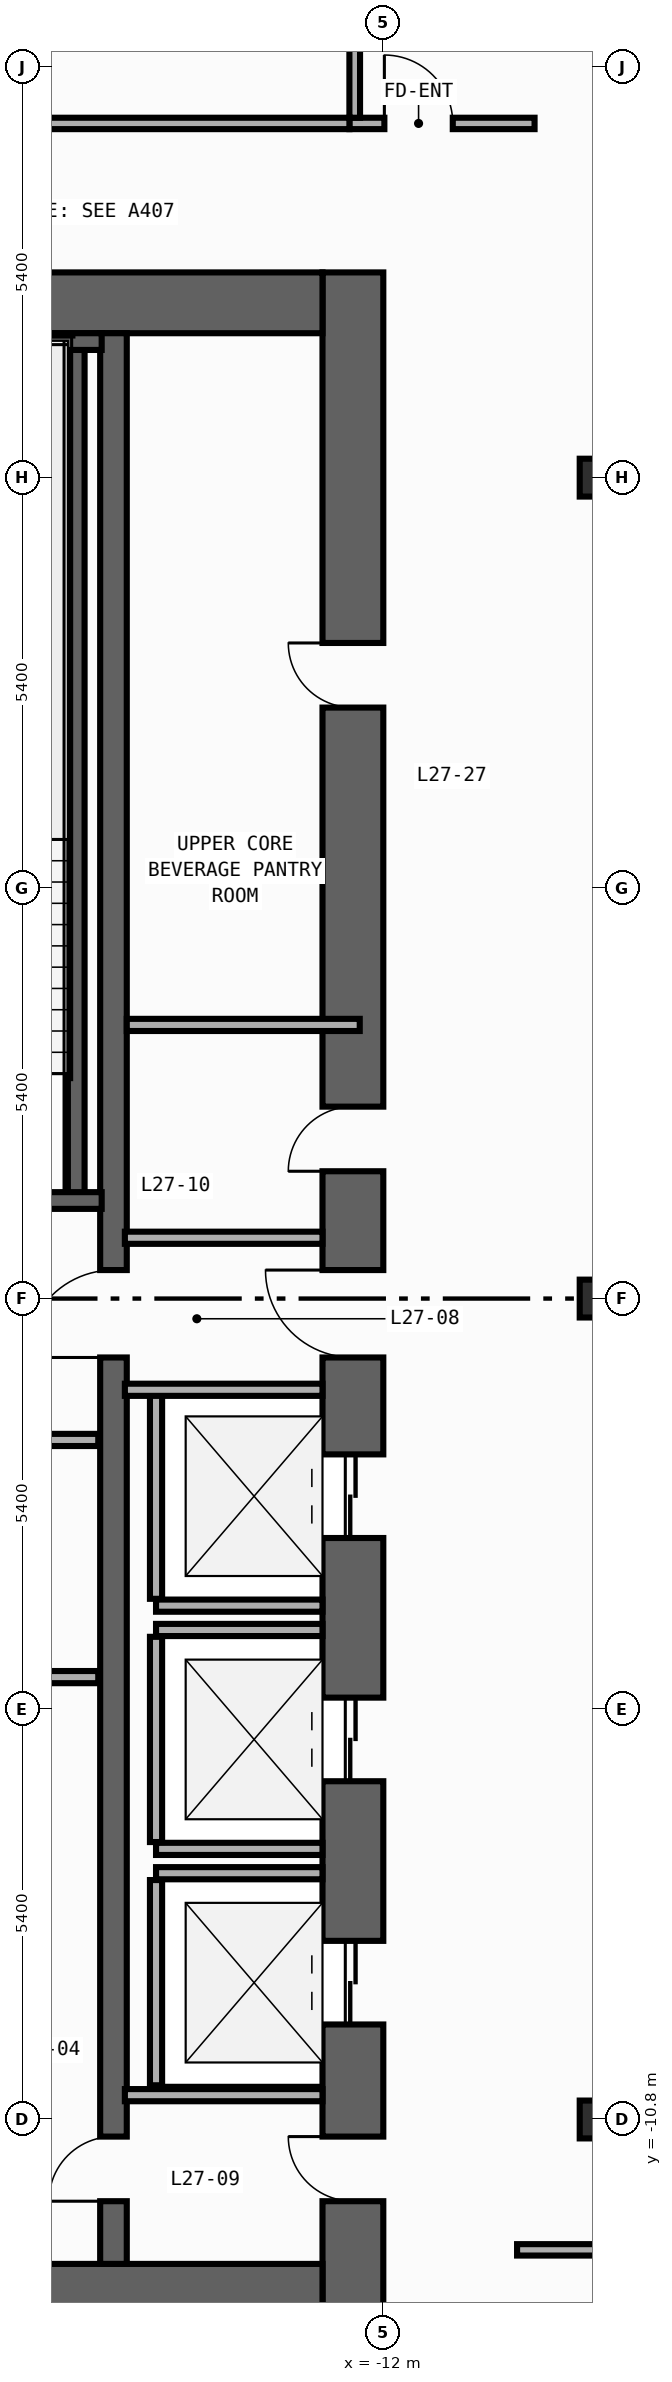
"""IFC4 building model, lengths in metres.
Left out: names, types, materials, properties, quantities, classifications, styles, units other than length and angle.
Written with IfcOpenShell. Run it as: python <this file> out.ifc"""

import sys

from ifc_helpers import new_model, si_unit, direction, frame, frame_2d, origin, origin_2d, place, context, subcontext, project, spatial, rectangle, i_section, extrude, element, fill, save


model = new_model("IFC4")
c1 = context("Model", 3, precision=1e-05, world=origin(), true_north=direction((0.0, 1.0)))
c2 = subcontext(c1, "Body", "Model", "MODEL_VIEW")
j1 = project(units=[si_unit("LENGTHUNIT", "METRE"), si_unit("PLANEANGLEUNIT", "RADIAN")], contexts=[c1])
p1 = place(None, origin())
s1 = spatial("IfcSite", under=j1, at=p1, CompositionType="ELEMENT")
p2 = place(p1, origin())
s2 = spatial("IfcBuilding", under=s1, at=p2, CompositionType="ELEMENT")
p3 = place(p2, frame((0.0, 0.0, 118.4)))
s3 = spatial("IfcBuildingStorey", under=s2, at=p3, CompositionType="ELEMENT", Elevation=118.4)
p4 = place(p3, frame((-12.4, -13.5, 0.0), z_axis=(0.0, 0.0, 1.0), x_axis=(0.0, 1.0, 0.0)))
e1 = element("IfcWall", 1, at=p4, inside=s3, PredefinedType="SHEAR", context=c2, shape_type="SweptSolid", body=[
    extrude(rectangle(XDim=27.0, YDim=0.8, at=frame_2d((13.5, 0.0))), origin(), (0.0, 0.0, 1.0), 3.94),
])
p5 = place(p4, frame((10.35, 0.0, 0.0)))
e2 = element("IfcOpeningElement", 2, at=p5, cuts=e1, PredefinedType="OPENING", context=c2, shape_type="SweptSolid", body=[
    extrude(rectangle(XDim=1.1, YDim=2.2, at=frame_2d((0.55, 1.1))), frame((0.0, 0.41, 0.0), z_axis=(0.0, -1.0, 0.0), x_axis=(1.0, 0.0, 0.0)), (0.0, 0.0, 1.0), 0.82),
])
p6 = place(p4, frame((7.15, 0.0, 0.0)))
e3 = element("IfcOpeningElement", 3, at=p6, cuts=e1, PredefinedType="OPENING", context=c2, shape_type="SweptSolid", body=[
    extrude(rectangle(XDim=1.1, YDim=2.2, at=frame_2d((0.55, 1.1))), frame((0.0, 0.41, 0.0), z_axis=(0.0, -1.0, 0.0), x_axis=(1.0, 0.0, 0.0)), (0.0, 0.0, 1.0), 0.82),
])
p7 = place(p4, frame((3.95, 0.0, 0.0)))
e4 = element("IfcOpeningElement", 4, at=p7, cuts=e1, PredefinedType="OPENING", context=c2, shape_type="SweptSolid", body=[
    extrude(rectangle(XDim=1.1, YDim=2.2, at=frame_2d((0.55, 1.1))), frame((0.0, 0.41, 0.0), z_axis=(0.0, -1.0, 0.0), x_axis=(1.0, 0.0, 0.0)), (0.0, 0.0, 1.0), 0.82),
])
p8 = place(p4, frame((15.175, 0.0, 0.0)))
e5 = element("IfcOpeningElement", 5, at=p8, cuts=e1, PredefinedType="OPENING", context=c2, shape_type="SweptSolid", body=[
    extrude(rectangle(XDim=0.85, YDim=2.1, at=frame_2d((0.425, 1.05))), frame((0.0, 0.41, 0.0), z_axis=(0.0, -1.0, 0.0), x_axis=(1.0, 0.0, 0.0)), (0.0, 0.0, 1.0), 0.82),
])
p9 = place(p4, frame((21.275, 0.0, 0.0)))
e6 = element("IfcOpeningElement", 6, at=p9, cuts=e1, PredefinedType="OPENING", context=c2, shape_type="SweptSolid", body=[
    extrude(rectangle(XDim=0.85, YDim=2.1, at=frame_2d((0.425, 1.05))), frame((0.0, 0.41, 0.0), z_axis=(0.0, -1.0, 0.0), x_axis=(1.0, 0.0, 0.0)), (0.0, 0.0, 1.0), 0.82),
])
p10 = place(p4, frame((12.725, 0.0, 0.0)))
e7 = element("IfcOpeningElement", 7, at=p10, cuts=e1, PredefinedType="OPENING", context=c2, shape_type="SweptSolid", body=[
    extrude(rectangle(XDim=1.15, YDim=2.2, at=frame_2d((0.575, 1.1))), frame((0.0, 0.41, 0.0), z_axis=(0.0, -1.0, 0.0), x_axis=(1.0, 0.0, 0.0)), (0.0, 0.0, 1.0), 0.82),
])
p11 = place(p4, frame((1.625, 0.0, 0.0)))
e8 = element("IfcOpeningElement", 8, at=p11, cuts=e1, PredefinedType="OPENING", context=c2, shape_type="SweptSolid", body=[
    extrude(rectangle(XDim=0.85, YDim=2.1, at=frame_2d((0.425, 1.05))), frame((0.0, 0.41, 0.0), z_axis=(0.0, -1.0, 0.0), x_axis=(1.0, 0.0, 0.0)), (0.0, 0.0, 1.0), 0.82),
])
for number, where, z_axis, x_axis in (
    (9, (-19.6, -13.1, 0.0), (0.0, 0.0, 1.0), (1.0, 0.0, 0.0)),
    (10, (-19.6, 13.1, 0.0), (0.0, 0.0, 1.0), (1.0, 0.0, 0.0)),
):
    element("IfcWall", number, at=place(p3, frame(where, z_axis=z_axis, x_axis=x_axis)), inside=s3, PredefinedType="SHEAR", context=c2, shape_type="SweptSolid", body=[
        extrude(rectangle(XDim=6.8, YDim=0.8, at=frame_2d((3.4, 0.0))), origin(), (0.0, 0.0, 1.0), 3.94),
    ])
p12 = place(p3, frame((-15.55, -12.7, 0.0), z_axis=(0.0, 0.0, 1.0), x_axis=(0.0, 1.0, 0.0)))
e11 = element("IfcWall", 11, at=p12, inside=s3, PredefinedType="SHEAR", context=c2, shape_type="SweptSolid", body=[
    extrude(rectangle(XDim=25.4, YDim=0.35, at=frame_2d((12.7, 0.0))), origin(), (0.0, 0.0, 1.0), 3.94),
])
p13 = place(p12, frame((11.925, 0.0, 0.0)))
e12 = element("IfcOpeningElement", 12, at=p13, cuts=e11, PredefinedType="OPENING", context=c2, shape_type="SweptSolid", body=[
    extrude(rectangle(XDim=1.15, YDim=2.2, at=frame_2d((0.575, 1.1))), frame((0.0, 0.185, 0.0), z_axis=(0.0, -1.0, 0.0), x_axis=(1.0, 0.0, 0.0)), (0.0, 0.0, 1.0), 0.37),
])
p14 = place(p12, frame((0.825, 0.0, 0.0)))
e13 = element("IfcOpeningElement", 13, at=p14, cuts=e11, PredefinedType="OPENING", context=c2, shape_type="SweptSolid", body=[
    extrude(rectangle(XDim=0.85, YDim=2.1, at=frame_2d((0.425, 1.05))), frame((0.0, 0.185, 0.0), z_axis=(0.0, -1.0, 0.0), x_axis=(1.0, 0.0, 0.0)), (0.0, 0.0, 1.0), 0.37),
])
p15 = place(p3, frame((-16.04, 1.29, 0.0), z_axis=(0.0, 0.0, 1.0), x_axis=(0.0, 1.0, 0.0)))
e14 = element("IfcWall", 14, at=p15, inside=s3, PredefinedType="SHEAR", context=c2, shape_type="SweptSolid", body=[
    extrude(rectangle(XDim=11.3, YDim=0.22, at=frame_2d((5.65, 0.0))), origin(), (0.0, 0.0, 1.0), 3.94),
])
p16 = place(p3, frame((-19.62, 12.59, 0.0), z_axis=(0.0, 0.0, 1.0), x_axis=(1.0, 0.0, 0.0)))
e15 = element("IfcWall", 15, at=p16, inside=s3, PredefinedType="SHEAR", context=c2, shape_type="SweptSolid", body=[
    extrude(rectangle(XDim=3.915, YDim=0.22, at=frame_2d((1.958, 0.0))), origin(), (0.0, 0.0, 1.0), 3.94),
])
p17 = place(p3, frame((-19.62, 1.29, 0.0), z_axis=(0.0, 0.0, 1.0), x_axis=(1.0, 0.0, 0.0)))
e16 = element("IfcWall", 16, at=p17, inside=s3, PredefinedType="SHEAR", context=c2, shape_type="SweptSolid", body=[
    extrude(rectangle(XDim=3.915, YDim=0.22, at=frame_2d((1.958, 0.0))), origin(), (0.0, 0.0, 1.0), 3.94),
])
p18 = place(p17, frame((1.08, 0.0, 0.0)))
e17 = element("IfcOpeningElement", 17, at=p18, cuts=e16, PredefinedType="OPENING", context=c2, shape_type="SweptSolid", body=[
    extrude(rectangle(XDim=1.1, YDim=2.2, at=frame_2d((0.55, 1.1))), frame((0.0, 0.12, 0.0), z_axis=(0.0, -1.0, 0.0), x_axis=(1.0, 0.0, 0.0)), (0.0, 0.0, 1.0), 0.24),
])
for number, where, z_axis, x_axis in (
    (18, (-9.2, -10.8, 0.0), (0.0, 0.0, 1.0), (1.0, 0.0, 0.0)),
    (19, (-9.2, 0.0, 0.0), (0.0, 0.0, 1.0), (1.0, 0.0, 0.0)),
    (20, (-9.2, 10.8, 0.0), (0.0, 0.0, 1.0), (1.0, 0.0, 0.0)),
):
    element("IfcColumn", number, at=place(p3, frame(where, z_axis=z_axis, x_axis=x_axis)), inside=s3, PredefinedType="COLUMN", context=c2, shape_type="SweptSolid", body=[
        extrude(i_section(OverallWidth=0.432, OverallDepth=0.498, WebThickness=0.045, FlangeThickness=0.07, FilletRadius=0.022, at=origin_2d()), origin(), (0.0, 0.0, 1.0), 4.2),
    ])
p19 = place(p3, frame((-14.99, -4.04, 0.0), z_axis=(0.0, 0.0, 1.0), x_axis=(1.0, 0.0, 0.0)))
e21 = element("IfcWall", 21, at=p19, inside=s3, PredefinedType="STANDARD", context=c2, shape_type="SweptSolid", body=[
    extrude(rectangle(XDim=2.19, YDim=0.16, at=frame_2d((1.095, 0.0))), origin(), (0.0, 0.0, 1.0), 3.94),
])
p20 = place(p3, frame((-14.99, -3.95, 0.0), z_axis=(0.0, 0.0, 1.0), x_axis=(0.0, 1.0, 0.0)))
e22 = element("IfcWall", 22, at=p20, inside=s3, PredefinedType="STANDARD", context=c2, shape_type="SweptSolid", body=[
    extrude(rectangle(XDim=2.7, YDim=0.16, at=frame_2d((1.35, 0.0))), origin(), (0.0, 0.0, 1.0), 3.94),
])
for number, where, z_axis, x_axis in (
    (23, (-14.99, -7.24, 0.0), (0.0, 0.0, 1.0), (1.0, 0.0, 0.0)),
    (24, (-14.99, -4.36, 0.0), (0.0, 0.0, 1.0), (1.0, 0.0, 0.0)),
):
    element("IfcWall", number, at=place(p3, frame(where, z_axis=z_axis, x_axis=x_axis)), inside=s3, PredefinedType="STANDARD", context=c2, shape_type="SweptSolid", body=[
        extrude(rectangle(XDim=2.19, YDim=0.16, at=frame_2d((1.095, 0.0))), origin(), (0.0, 0.0, 1.0), 3.94),
    ])
p21 = place(p3, frame((-14.99, -7.15, 0.0), z_axis=(0.0, 0.0, 1.0), x_axis=(0.0, 1.0, 0.0)))
e25 = element("IfcWall", 25, at=p21, inside=s3, PredefinedType="STANDARD", context=c2, shape_type="SweptSolid", body=[
    extrude(rectangle(XDim=2.7, YDim=0.16, at=frame_2d((1.35, 0.0))), origin(), (0.0, 0.0, 1.0), 3.94),
])
p22 = place(p3, frame((-14.99, -7.56, 0.0), z_axis=(0.0, 0.0, 1.0), x_axis=(1.0, 0.0, 0.0)))
e26 = element("IfcWall", 26, at=p22, inside=s3, PredefinedType="STANDARD", context=c2, shape_type="SweptSolid", body=[
    extrude(rectangle(XDim=2.19, YDim=0.16, at=frame_2d((1.095, 0.0))), origin(), (0.0, 0.0, 1.0), 3.94),
])
p23 = place(p3, frame((-14.99, -10.35, 0.0), z_axis=(0.0, 0.0, 1.0), x_axis=(0.0, 1.0, 0.0)))
e27 = element("IfcWall", 27, at=p23, inside=s3, PredefinedType="STANDARD", context=c2, shape_type="SweptSolid", body=[
    extrude(rectangle(XDim=2.7, YDim=0.16, at=frame_2d((1.35, 0.0))), origin(), (0.0, 0.0, 1.0), 3.94),
])
p24 = place(p3, frame((-19.55, -1.86, 0.0), z_axis=(0.0, 0.0, 1.0), x_axis=(1.0, 0.0, 0.0)))
e28 = element("IfcWall", 28, at=p24, inside=s3, PredefinedType="STANDARD", context=c2, shape_type="SweptSolid", body=[
    extrude(rectangle(XDim=3.8, YDim=0.16, at=frame_2d((1.9, 0.0))), origin(), (0.0, 0.0, 1.0), 3.94),
])
p25 = place(p24, frame((1.18, 0.0, 0.0)))
e29 = element("IfcOpeningElement", 29, at=p25, cuts=e28, PredefinedType="OPENING", context=c2, shape_type="SweptSolid", body=[
    extrude(rectangle(XDim=1.15, YDim=2.2, at=frame_2d((0.575, 1.1))), frame((0.0, 0.09, 0.0), z_axis=(0.0, -1.0, 0.0), x_axis=(1.0, 0.0, 0.0)), (0.0, 0.0, 1.0), 0.18),
])
p26 = place(p3, frame((-19.55, -4.98, 0.0), z_axis=(0.0, 0.0, 1.0), x_axis=(1.0, 0.0, 0.0)))
e30 = element("IfcWall", 30, at=p26, inside=s3, PredefinedType="STANDARD", context=c2, shape_type="SweptSolid", body=[
    extrude(rectangle(XDim=3.8, YDim=0.16, at=frame_2d((1.9, 0.0))), origin(), (0.0, 0.0, 1.0), 3.94),
])
for number, where, z_axis, x_axis in (
    (31, (-15.4, 0.8, 0.0), (0.0, 0.0, 1.0), (1.0, 0.0, 0.0)),
    (32, (-15.4, -1.2, 0.0), (0.0, 0.0, 1.0), (1.0, 0.0, 0.0)),
    (33, (-15.4, -10.48, 0.0), (0.0, 0.0, 1.0), (1.0, 0.0, 0.0)),
):
    element("IfcWall", number, at=place(p3, frame(where, z_axis=z_axis, x_axis=x_axis)), inside=s3, PredefinedType="STANDARD", context=c2, shape_type="SweptSolid", body=[
        extrude(rectangle(XDim=2.6, YDim=0.16, at=frame_2d((1.3, 0.0))), origin(), (0.0, 0.0, 1.0), 3.94),
    ])
p27 = place(p3, frame((-15.375, 3.6, 0.0), z_axis=(0.0, 0.0, 1.0), x_axis=(1.0, 0.0, 0.0)))
e34 = element("IfcWall", 34, at=p27, inside=s3, PredefinedType="PARTITIONING", context=c2, shape_type="SweptSolid", body=[
    extrude(rectangle(XDim=3.065, YDim=0.16, at=frame_2d((1.532, 0.0))), origin(), (0.0, 0.0, 1.0), 3.94),
])
p28 = place(p3, frame((-12.446, 15.46, 0.0), z_axis=(0.0, 0.0, 1.0), x_axis=(1.0, 0.0, 0.0)))
e35 = element("IfcWall", 35, at=p28, inside=s3, PredefinedType="PARTITIONING", context=c2, shape_type="SweptSolid", body=[
    extrude(rectangle(XDim=2.436, YDim=0.15, at=frame_2d((1.218, 0.0))), origin(), (0.0, 0.0, 1.0), 3.94),
])
p29 = place(p28, frame((0.46, 0.0, 0.0)))
e36 = element("IfcOpeningElement", 36, at=p29, cuts=e35, PredefinedType="OPENING", context=c2, shape_type="SweptSolid", body=[
    extrude(rectangle(XDim=0.9, YDim=2.15, at=frame_2d((0.45, 1.075))), frame((0.0, 0.085, 0.0), z_axis=(0.0, -1.0, 0.0), x_axis=(1.0, 0.0, 0.0)), (0.0, 0.0, 1.0), 0.17),
])
p30 = place(p3, frame((-10.24, -12.515, 0.0), z_axis=(0.0, 0.0, 1.0), x_axis=(1.0, 0.0, 0.0)))
e37 = element("IfcWall", 37, at=p30, inside=s3, PredefinedType="PARTITIONING", context=c2, shape_type="SweptSolid", body=[
    extrude(rectangle(XDim=8.455, YDim=0.15, at=frame_2d((4.228, 0.0))), origin(), (0.0, 0.0, 1.0), 3.94),
])
p31 = place(p30, frame((7.095, 0.0, 0.0)))
e38 = element("IfcOpeningElement", 38, at=p31, cuts=e37, PredefinedType="OPENING", context=c2, shape_type="SweptSolid", body=[
    extrude(rectangle(XDim=0.9, YDim=2.15, at=frame_2d((0.45, 1.075))), frame((0.0, 0.085, 0.0), z_axis=(0.0, -1.0, 0.0), x_axis=(1.0, 0.0, 0.0)), (0.0, 0.0, 1.0), 0.17),
])
p32 = place(p3, frame((-20.64, 15.46, 0.0), z_axis=(0.0, 0.0, 1.0), x_axis=(1.0, 0.0, 0.0)))
e39 = element("IfcWall", 39, at=p32, inside=s3, PredefinedType="PARTITIONING", context=c2, shape_type="SweptSolid", body=[
    extrude(rectangle(XDim=8.194, YDim=0.15, at=frame_2d((4.097, 0.0))), origin(), (0.0, 0.0, 1.0), 3.94),
])
p33 = place(p32, frame((2.722, 0.0, 0.0)))
e40 = element("IfcOpeningElement", 40, at=p33, cuts=e39, PredefinedType="OPENING", context=c2, shape_type="SweptSolid", body=[
    extrude(rectangle(XDim=0.9, YDim=2.15, at=frame_2d((0.45, 1.075))), frame((0.0, 0.085, 0.0), z_axis=(0.0, -1.0, 0.0), x_axis=(1.0, 0.0, 0.0)), (0.0, 0.0, 1.0), 0.17),
])
p34 = place(p3, frame((-12.376, 15.535, 0.0), z_axis=(0.0, 0.0, 1.0), x_axis=(0.0, 1.0, 0.0)))
e41 = element("IfcWall", 41, at=p34, inside=s3, PredefinedType="PARTITIONING", context=c2, shape_type="SweptSolid", body=[
    extrude(rectangle(XDim=10.62, YDim=0.14, at=frame_2d((5.31, 0.0))), origin(), (0.0, 0.0, 1.0), 3.94),
])
p35 = place(p5, origin())
e42 = element("IfcDoor", 42, at=p35, inside=s3, OperationType="DOUBLE_DOOR_SLIDING", PredefinedType="DOOR", context=c2, shape_type="SweptSolid", body=[
    extrude(rectangle(XDim=1.1, YDim=2.2, at=frame_2d((0.55, 1.1))), frame((0.0, 0.025, 0.0), z_axis=(0.0, -1.0, 0.0), x_axis=(1.0, 0.0, 0.0)), (0.0, 0.0, 1.0), 0.05),
])
fill(e2, e42)
p36 = place(p6, origin())
e43 = element("IfcDoor", 43, at=p36, inside=s3, OperationType="DOUBLE_DOOR_SLIDING", PredefinedType="DOOR", context=c2, shape_type="SweptSolid", body=[
    extrude(rectangle(XDim=1.1, YDim=2.2, at=frame_2d((0.55, 1.1))), frame((0.0, 0.025, 0.0), z_axis=(0.0, -1.0, 0.0), x_axis=(1.0, 0.0, 0.0)), (0.0, 0.0, 1.0), 0.05),
])
fill(e3, e43)
p37 = place(p7, origin())
e44 = element("IfcDoor", 44, at=p37, inside=s3, OperationType="DOUBLE_DOOR_SLIDING", PredefinedType="DOOR", context=c2, shape_type="SweptSolid", body=[
    extrude(rectangle(XDim=1.1, YDim=2.2, at=frame_2d((0.55, 1.1))), frame((0.0, 0.025, 0.0), z_axis=(0.0, -1.0, 0.0), x_axis=(1.0, 0.0, 0.0)), (0.0, 0.0, 1.0), 0.05),
])
fill(e4, e44)
p38 = place(p8, origin())
e45 = element("IfcDoor", 45, at=p38, inside=s3, OperationType="SINGLE_SWING_LEFT", PredefinedType="DOOR", context=c2, shape_type="SweptSolid", body=[
    extrude(rectangle(XDim=0.85, YDim=2.1, at=frame_2d((0.425, 1.05))), frame((0.0, 0.025, 0.0), z_axis=(0.0, -1.0, 0.0), x_axis=(1.0, 0.0, 0.0)), (0.0, 0.0, 1.0), 0.05),
])
fill(e5, e45)
p39 = place(p9, origin())
e46 = element("IfcDoor", 46, at=p39, inside=s3, OperationType="SINGLE_SWING_RIGHT", PredefinedType="DOOR", context=c2, shape_type="SweptSolid", body=[
    extrude(rectangle(XDim=0.85, YDim=2.1, at=frame_2d((0.425, 1.05))), frame((0.0, 0.025, 0.0), z_axis=(0.0, -1.0, 0.0), x_axis=(1.0, 0.0, 0.0)), (0.0, 0.0, 1.0), 0.05),
])
fill(e6, e46)
p40 = place(p10, origin())
e47 = element("IfcDoor", 47, at=p40, inside=s3, OperationType="SINGLE_SWING_RIGHT", PredefinedType="DOOR", context=c2, shape_type="SweptSolid", body=[
    extrude(rectangle(XDim=1.15, YDim=2.2, at=frame_2d((0.575, 1.1))), frame((0.0, 0.025, 0.0), z_axis=(0.0, -1.0, 0.0), x_axis=(1.0, 0.0, 0.0)), (0.0, 0.0, 1.0), 0.05),
])
fill(e7, e47)
p41 = place(p13, origin())
e48 = element("IfcDoor", 48, at=p41, inside=s3, OperationType="SINGLE_SWING_LEFT", PredefinedType="DOOR", context=c2, shape_type="SweptSolid", body=[
    extrude(rectangle(XDim=1.15, YDim=2.2, at=frame_2d((0.575, 1.1))), frame((0.0, 0.025, 0.0), z_axis=(0.0, -1.0, 0.0), x_axis=(1.0, 0.0, 0.0)), (0.0, 0.0, 1.0), 0.05),
])
fill(e12, e48)
p42 = place(p11, origin())
e49 = element("IfcDoor", 49, at=p42, inside=s3, OperationType="SINGLE_SWING_RIGHT", PredefinedType="DOOR", context=c2, shape_type="SweptSolid", body=[
    extrude(rectangle(XDim=0.85, YDim=2.1, at=frame_2d((0.425, 1.05))), frame((0.0, 0.025, 0.0), z_axis=(0.0, -1.0, 0.0), x_axis=(1.0, 0.0, 0.0)), (0.0, 0.0, 1.0), 0.05),
])
fill(e8, e49)
p43 = place(p14, origin())
e50 = element("IfcDoor", 50, at=p43, inside=s3, OperationType="SINGLE_SWING_LEFT", PredefinedType="DOOR", context=c2, shape_type="SweptSolid", body=[
    extrude(rectangle(XDim=0.85, YDim=2.1, at=frame_2d((0.425, 1.05))), frame((0.0, 0.025, 0.0), z_axis=(0.0, -1.0, 0.0), x_axis=(1.0, 0.0, 0.0)), (0.0, 0.0, 1.0), 0.05),
])
fill(e13, e50)
p44 = place(p29, origin())
e51 = element("IfcDoor", 51, at=p44, inside=s3, OperationType="SINGLE_SWING_LEFT", PredefinedType="DOOR", context=c2, shape_type="SweptSolid", body=[
    extrude(rectangle(XDim=0.9, YDim=2.15, at=frame_2d((0.45, 1.075))), frame((0.0, 0.025, 0.0), z_axis=(0.0, -1.0, 0.0), x_axis=(1.0, 0.0, 0.0)), (0.0, 0.0, 1.0), 0.05),
])
fill(e36, e51)
save(model, sys.argv[1])
